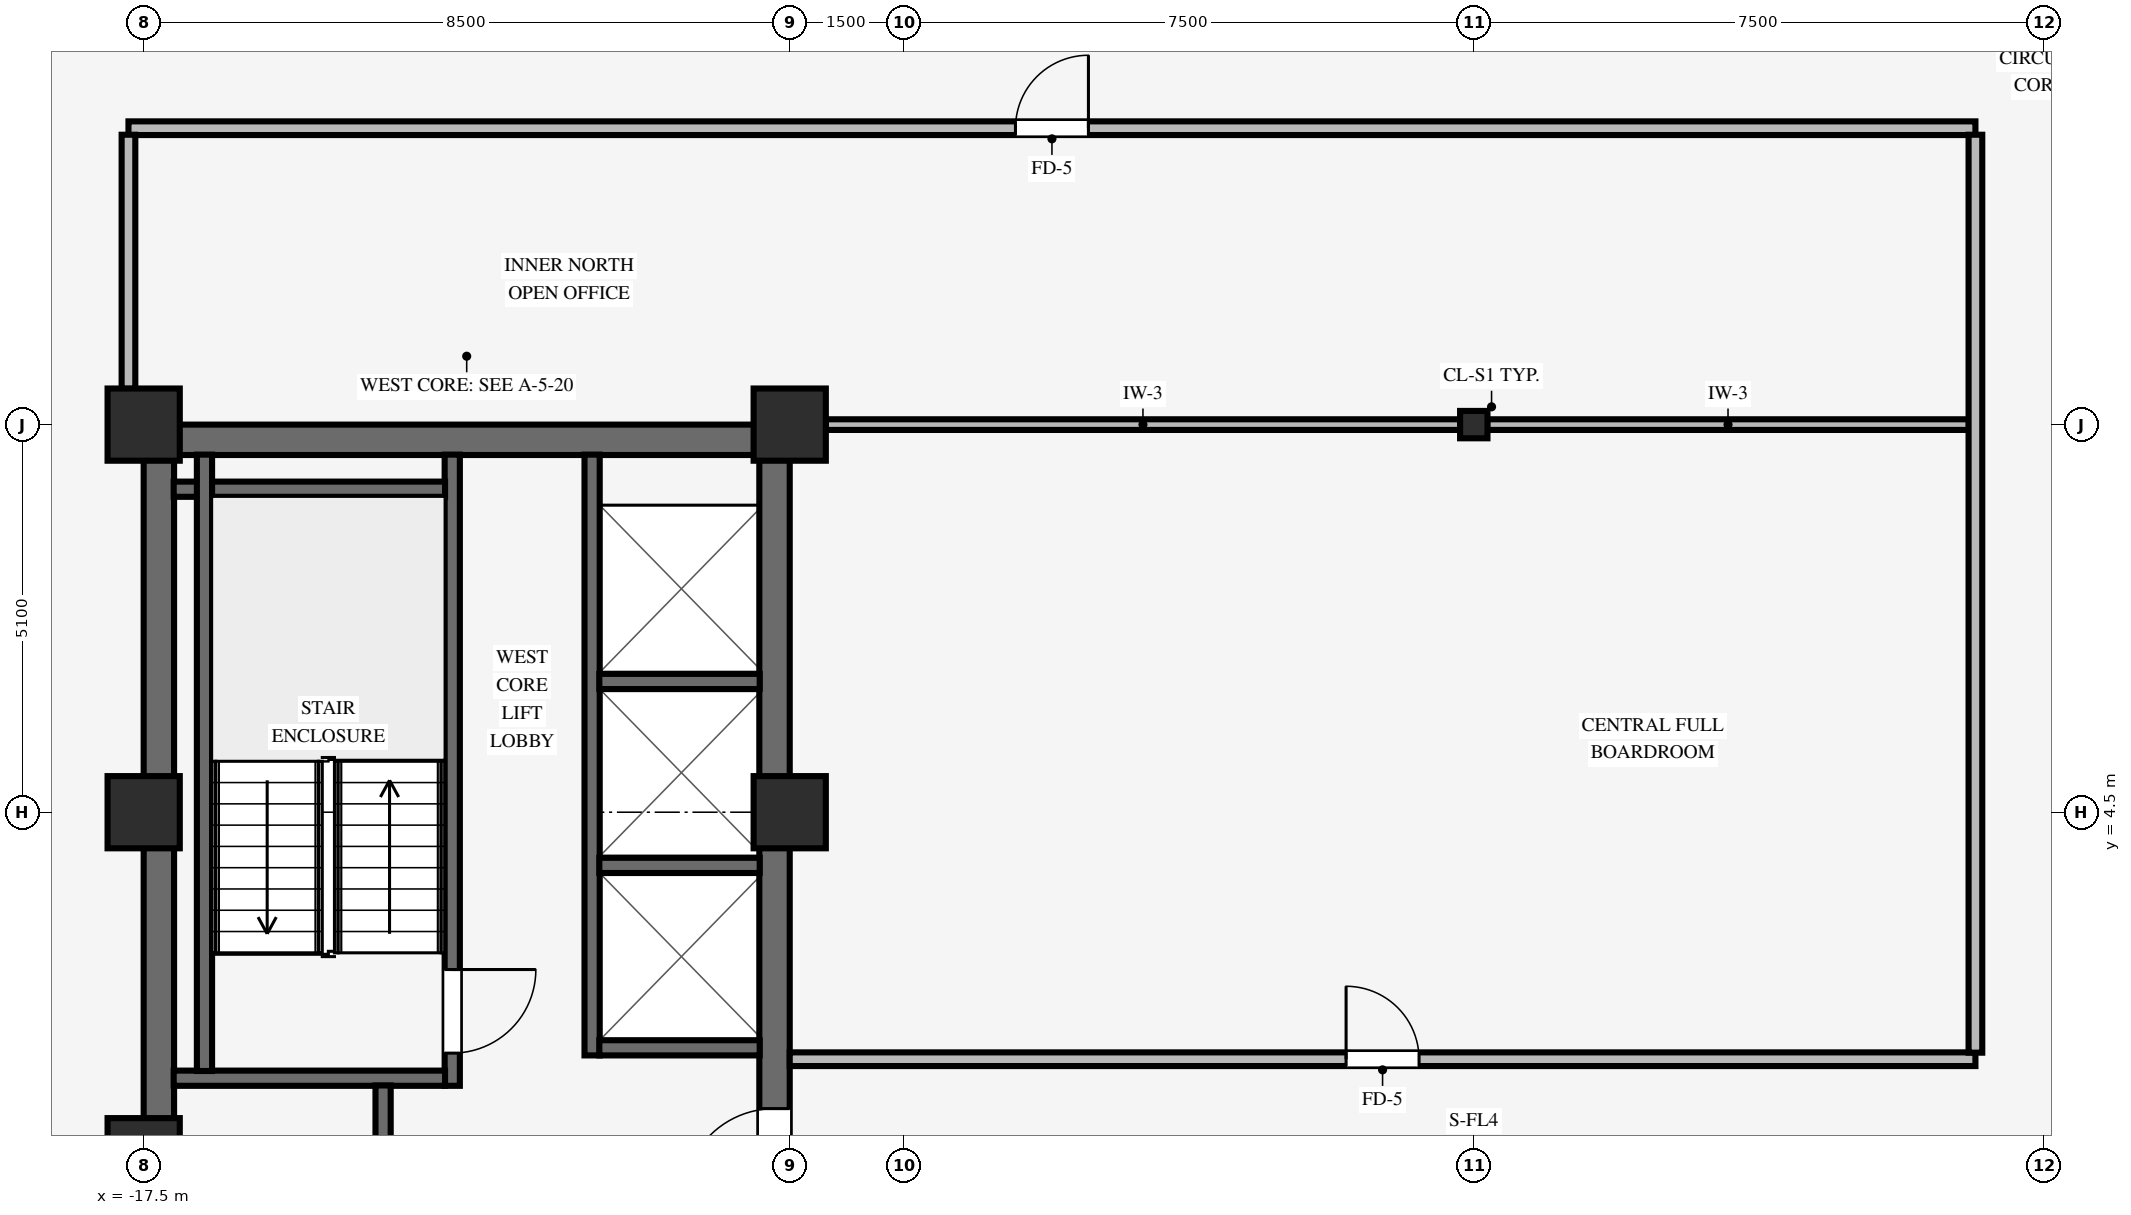
"""IFC4 building model, lengths in metres.
Left out: names, types, materials, properties, quantities, classifications, styles, units other than length and angle.
Written with IfcOpenShell. Run it as: python <this file> out.ifc"""

import sys

from ifc_helpers import new_model, si_unit, direction, frame, frame_2d, origin, origin_2d, place, context, subcontext, project, spatial, rectangle, i_section, extrude, source, transform, mapped, element, fill, save


model = new_model("IFC4")
c1 = context("Model", 3, precision=1e-05, world=origin(), true_north=direction((0.0, 1.0)))
c2 = subcontext(c1, "Body", "Model", "MODEL_VIEW")
j1 = project(units=[si_unit("LENGTHUNIT", "METRE"), si_unit("PLANEANGLEUNIT", "RADIAN")], contexts=[c1])
p1 = place(None, origin())
s1 = spatial("IfcSite", under=j1, at=p1, CompositionType="ELEMENT")
p2 = place(p1, origin())
s2 = spatial("IfcBuilding", under=s1, at=p2, CompositionType="ELEMENT")
p3 = place(p2, frame((0.0, 0.0, 149.4)))
s3 = spatial("IfcBuildingStorey", under=s2, at=p3, CompositionType="ELEMENT", Elevation=149.4)
p4 = place(p3, frame((-17.5, 9.4, 0.0), z_axis=(0.0, 0.0, 1.0), x_axis=(1.0, 0.0, 0.0)))
e1 = element("IfcWall", 1, at=p4, inside=s3, PredefinedType="SHEAR", context=c2, shape_type="SweptSolid", body=[
    extrude(rectangle(XDim=8.5, YDim=0.4, at=frame_2d((4.25, 0.0))), origin(), (0.0, 0.0, 1.0), 3.37),
])
p5 = place(p3, frame((-17.3, -9.205, 0.0), z_axis=(0.0, 0.0, 1.0), x_axis=(0.0, 1.0, 0.0)))
e2 = element("IfcWall", 2, at=p5, inside=s3, PredefinedType="SHEAR", context=c2, shape_type="SweptSolid", body=[
    extrude(rectangle(XDim=18.41, YDim=0.4, at=frame_2d((9.205, 0.0))), origin(), (0.0, 0.0, 1.0), 3.37),
])
p6 = place(p3, frame((-9.2, -9.205, 0.0), z_axis=(0.0, 0.0, 1.0), x_axis=(0.0, 1.0, 0.0)))
e3 = element("IfcWall", 3, at=p6, inside=s3, PredefinedType="SHEAR", context=c2, shape_type="SweptSolid", body=[
    extrude(rectangle(XDim=18.41, YDim=0.4, at=frame_2d((9.205, 0.0))), origin(), (0.0, 0.0, 1.0), 3.37),
])
p7 = place(p6, frame((8.605, 0.0, 0.0)))
e4 = element("IfcOpeningElement", 4, at=p7, cuts=e3, PredefinedType="OPENING", context=c2, shape_type="SweptSolid", body=[
    extrude(rectangle(XDim=1.2, YDim=2.15, at=frame_2d((0.6, 1.075))), frame((0.0, 0.21, 0.0), z_axis=(0.0, -1.0, 0.0), x_axis=(1.0, 0.0, 0.0)), (0.0, 0.0, 1.0), 0.42),
])
for number, where, z_axis, x_axis in (
    (5, (-17.5, 4.5, 0.0), (0.0, 0.0, 1.0), (1.0, 0.0, 0.0)),
    (6, (-17.5, 9.6, 0.0), (0.0, 0.0, 1.0), (1.0, 0.0, 0.0)),
    (7, (-9.0, 4.5, 0.0), (0.0, 0.0, 1.0), (1.0, 0.0, 0.0)),
    (8, (-9.0, 9.6, 0.0), (0.0, 0.0, 1.0), (1.0, 0.0, 0.0)),
    (9, (-17.5, 0.0, 0.0), (0.0, 0.0, 1.0), (1.0, 0.0, 0.0)),
):
    element("IfcColumn", number, at=place(p3, frame(where, z_axis=z_axis, x_axis=x_axis)), inside=s3, PredefinedType="COLUMN", context=c2, shape_type="SweptSolid", body=[
        extrude(rectangle(XDim=0.95, YDim=0.95, at=origin_2d()), origin(), (0.0, 0.0, 1.0), 3.37),
    ])
p8 = place(p3, frame((0.0, 9.6, 0.0), z_axis=(0.0, 0.0, 1.0), x_axis=(1.0, 0.0, 0.0)))
e10 = element("IfcColumn", 10, at=p8, inside=s3, PredefinedType="COLUMN", context=c2, shape_type="SweptSolid", body=[
    extrude(i_section(OverallWidth=0.36, OverallDepth=0.36, WebThickness=0.021, FlangeThickness=0.021, FilletRadius=0.018, at=origin_2d()), origin(), (0.0, 0.0, 1.0), 3.37),
])
p9 = place(p3, frame((-13.44, 0.9, 0.0), z_axis=(0.0, 0.0, 1.0), x_axis=(0.0, 1.0, 0.0)))
e11 = element("IfcWall", 11, at=p9, inside=s3, PredefinedType="SHEAR", context=c2, shape_type="SweptSolid", body=[
    extrude(rectangle(XDim=8.305, YDim=0.2, at=frame_2d((4.153, 0.0))), origin(), (0.0, 0.0, 1.0), 3.37),
])
p10 = place(p9, frame((1.53, 0.0, 0.0), z_axis=(0.0, 0.0, 1.0), x_axis=(-1.0, 0.0, 0.0)))
e12 = element("IfcOpeningElement", 12, at=p10, cuts=e11, PredefinedType="OPENING", context=c2, shape_type="SweptSolid", body=[
    extrude(rectangle(XDim=1.1, YDim=2.15, at=frame_2d((0.55, 1.075))), frame((0.0, 0.11, 0.0), z_axis=(0.0, -1.0, 0.0), x_axis=(1.0, 0.0, 0.0)), (0.0, 0.0, 1.0), 0.22),
])
for number, where, z_axis, x_axis in (
    (13, (-17.105, 1.0, 0.0), (0.0, 0.0, 1.0), (1.0, 0.0, 0.0)),
    (14, (-17.105, 8.75, 0.0), (0.0, 0.0, 1.0), (1.0, 0.0, 0.0)),
):
    element("IfcWall", number, at=place(p3, frame(where, z_axis=z_axis, x_axis=x_axis)), inside=s3, PredefinedType="SHEAR", context=c2, shape_type="SweptSolid", body=[
        extrude(rectangle(XDim=3.57, YDim=0.2, at=frame_2d((1.785, 0.0))), origin(), (0.0, 0.0, 1.0), 3.37),
    ])
p11 = place(p3, frame((-16.7, 1.095, 0.0), z_axis=(0.0, 0.0, 1.0), x_axis=(0.0, 1.0, 0.0)))
e15 = element("IfcWall", 15, at=p11, inside=s3, PredefinedType="SHEAR", context=c2, shape_type="SweptSolid", body=[
    extrude(rectangle(XDim=8.11, YDim=0.2, at=frame_2d((4.055, 0.0))), origin(), (0.0, 0.0, 1.0), 3.37),
])
p12 = place(p3, frame((-14.35, -6.2, 0.0), z_axis=(0.0, 0.0, 1.0), x_axis=(0.0, 1.0, 0.0)))
e16 = element("IfcWall", 16, at=p12, inside=s3, PredefinedType="SHEAR", context=c2, shape_type="SweptSolid", body=[
    extrude(rectangle(XDim=7.105, YDim=0.2, at=frame_2d((3.552, 0.0))), origin(), (0.0, 0.0, 1.0), 3.37),
])
p13 = place(p12, frame((5.69, 0.0, 0.0), z_axis=(0.0, 0.0, 1.0), x_axis=(-1.0, 0.0, 0.0)))
e17 = element("IfcOpeningElement", 17, at=p13, cuts=e16, PredefinedType="OPENING", context=c2, shape_type="SweptSolid", body=[
    extrude(rectangle(XDim=0.88, YDim=2.1, at=frame_2d((0.44, 1.05))), frame((0.0, 0.11, 0.0), z_axis=(0.0, -1.0, 0.0), x_axis=(1.0, 0.0, 0.0)), (0.0, 0.0, 1.0), 0.22),
])
p14 = place(p12, frame((1.15, 0.0, 0.0)))
e18 = element("IfcOpeningElement", 18, at=p14, cuts=e16, PredefinedType="OPENING", context=c2, shape_type="SweptSolid", body=[
    extrude(rectangle(XDim=1.3, YDim=2.2, at=frame_2d((0.65, 1.1))), frame((0.0, 0.11, 0.0), z_axis=(0.0, -1.0, 0.0), x_axis=(1.0, 0.0, 0.0)), (0.0, 0.0, 1.0), 0.22),
])
p15 = place(p3, frame((-11.6, 1.3, 0.0), z_axis=(0.0, 0.0, 1.0), x_axis=(0.0, 1.0, 0.0)))
e19 = element("IfcWall", 19, at=p15, inside=s3, PredefinedType="SHEAR", context=c2, shape_type="SweptSolid", body=[
    extrude(rectangle(XDim=7.905, YDim=0.2, at=frame_2d((3.953, 0.0))), origin(), (0.0, 0.0, 1.0), 3.37),
])
for number, where, z_axis, x_axis in (
    (20, (-11.505, 1.4, 0.0), (0.0, 0.0, 1.0), (1.0, 0.0, 0.0)),
    (21, (-11.505, 3.8, 0.0), (0.0, 0.0, 1.0), (1.0, 0.0, 0.0)),
    (22, (-11.505, 6.22, 0.0), (0.0, 0.0, 1.0), (1.0, 0.0, 0.0)),
):
    element("IfcWall", number, at=place(p3, frame(where, z_axis=z_axis, x_axis=x_axis)), inside=s3, PredefinedType="SHEAR", context=c2, shape_type="SweptSolid", body=[
        extrude(rectangle(XDim=2.11, YDim=0.2, at=frame_2d((1.055, 0.0))), origin(), (0.0, 0.0, 1.0), 3.37),
    ])
p16 = place(p3, frame((-9.0, 1.25, 0.0), z_axis=(0.0, 0.0, 1.0), x_axis=(1.0, 0.0, 0.0)))
e23 = element("IfcWall", 23, at=p16, inside=s3, PredefinedType="PARTITIONING", context=c2, shape_type="SweptSolid", body=[
    extrude(rectangle(XDim=15.6, YDim=0.18, at=frame_2d((7.8, 0.0))), origin(), (0.0, 0.0, 1.0), 3.36),
])
p17 = place(p16, frame((7.32, 0.0, 0.0)))
e24 = element("IfcOpeningElement", 24, at=p17, cuts=e23, PredefinedType="OPENING", context=c2, shape_type="SweptSolid", body=[
    extrude(rectangle(XDim=0.96, YDim=2.1, at=frame_2d((0.48, 1.05))), frame((0.0, 0.1, 0.0), z_axis=(0.0, -1.0, 0.0), x_axis=(1.0, 0.0, 0.0)), (0.0, 0.0, 1.0), 0.2),
])
p18 = place(p3, frame((-8.529, 9.6, 0.0), z_axis=(0.0, 0.0, 1.0), x_axis=(1.0, 0.0, 0.0)))
e25 = element("IfcWall", 25, at=p18, inside=s3, PredefinedType="PARTITIONING", context=c2, shape_type="SweptSolid", body=[
    extrude(rectangle(XDim=8.353, YDim=0.14, at=frame_2d((4.177, 0.0))), origin(), (0.0, 0.0, 1.0), 2.405),
])
p19 = place(p3, frame((0.176, 9.6, 0.0), z_axis=(0.0, 0.0, 1.0), x_axis=(1.0, 0.0, 0.0)))
e26 = element("IfcWall", 26, at=p19, inside=s3, PredefinedType="PARTITIONING", context=c2, shape_type="SweptSolid", body=[
    extrude(rectangle(XDim=6.338, YDim=0.14, at=frame_2d((3.169, 0.0))), origin(), (0.0, 0.0, 1.0), 2.405),
])
p20 = place(p3, frame((-17.7, 13.5, 0.0), z_axis=(0.0, 0.0, 1.0), x_axis=(1.0, 0.0, 0.0)))
e27 = element("IfcWall", 27, at=p20, inside=s3, PredefinedType="PARTITIONING", context=c2, shape_type="SweptSolid", body=[
    extrude(rectangle(XDim=24.3, YDim=0.18, at=frame_2d((12.15, 0.0))), origin(), (0.0, 0.0, 1.0), 2.998),
])
p21 = place(p20, frame((11.67, 0.0, 0.0)))
e28 = element("IfcOpeningElement", 28, at=p21, cuts=e27, PredefinedType="OPENING", context=c2, shape_type="SweptSolid", body=[
    extrude(rectangle(XDim=0.96, YDim=2.1, at=frame_2d((0.48, 1.05))), frame((0.0, 0.1, 0.0), z_axis=(0.0, -1.0, 0.0), x_axis=(1.0, 0.0, 0.0)), (0.0, 0.0, 1.0), 0.2),
])
p22 = place(p3, frame((-17.7, 10.071, 0.0), z_axis=(0.0, 0.0, 1.0), x_axis=(0.0, 1.0, 0.0)))
e29 = element("IfcWall", 29, at=p22, inside=s3, PredefinedType="PARTITIONING", context=c2, shape_type="SweptSolid", body=[
    extrude(rectangle(XDim=3.343, YDim=0.18, at=frame_2d((1.671, 0.0))), origin(), (0.0, 0.0, 1.0), 2.816),
])
p23 = place(p3, frame((6.6, 1.336, 0.0), z_axis=(0.0, 0.0, 1.0), x_axis=(0.0, 1.0, 0.0)))
e30 = element("IfcWall", 30, at=p23, inside=s3, PredefinedType="PARTITIONING", context=c2, shape_type="SweptSolid", body=[
    extrude(rectangle(XDim=12.078, YDim=0.18, at=frame_2d((6.039, 0.0))), origin(), (0.0, 0.0, 1.0), 3.36),
])
m1 = source(origin(), c2, "Body", "SweptSolid", [
    extrude(rectangle(XDim=1.1, YDim=2.15, at=frame_2d((0.55, 1.075))), frame((0.0, 0.025, 0.0), z_axis=(0.0, -1.0, 0.0), x_axis=(1.0, 0.0, 0.0)), (0.0, 0.0, 1.0), 0.05),
])
p24 = place(p10, origin())
e31 = element("IfcDoor", 31, at=p24, inside=s3, OperationType="SINGLE_SWING_LEFT", PredefinedType="DOOR", context=c2, shape_type="MappedRepresentation", body=[
    mapped(m1, transform((0.0, 0.0, 0.0), scale=1.0)),
])
fill(e12, e31)
m2 = source(origin(), c2, "Body", "SweptSolid", [
    extrude(rectangle(XDim=1.2, YDim=2.15, at=frame_2d((0.6, 1.075))), frame((0.0, 0.025, 0.0), z_axis=(0.0, -1.0, 0.0), x_axis=(1.0, 0.0, 0.0)), (0.0, 0.0, 1.0), 0.05),
])
p25 = place(p7, origin())
e32 = element("IfcDoor", 32, at=p25, inside=s3, OperationType="SINGLE_SWING_LEFT", PredefinedType="DOOR", context=c2, shape_type="MappedRepresentation", body=[
    mapped(m2, transform((0.0, 0.0, 0.0), scale=1.0)),
])
fill(e4, e32)
m3 = source(origin(), c2, "Body", "SweptSolid", [
    extrude(rectangle(XDim=0.96, YDim=2.1, at=frame_2d((0.48, 1.05))), frame((0.0, 0.025, 0.0), z_axis=(0.0, -1.0, 0.0), x_axis=(1.0, 0.0, 0.0)), (0.0, 0.0, 1.0), 0.05),
])
p26 = place(p21, origin())
e33 = element("IfcDoor", 33, at=p26, inside=s3, OperationType="SINGLE_SWING_RIGHT", PredefinedType="DOOR", context=c2, shape_type="MappedRepresentation", body=[
    mapped(m3, transform((0.0, 0.0, 0.0), scale=1.0)),
])
fill(e28, e33)
p27 = place(p17, origin())
e34 = element("IfcDoor", 34, at=p27, inside=s3, OperationType="SINGLE_SWING_LEFT", PredefinedType="DOOR", context=c2, shape_type="MappedRepresentation", body=[
    mapped(m3, transform((0.0, 0.0, 0.0), scale=1.0)),
])
fill(e24, e34)
save(model, sys.argv[1])
